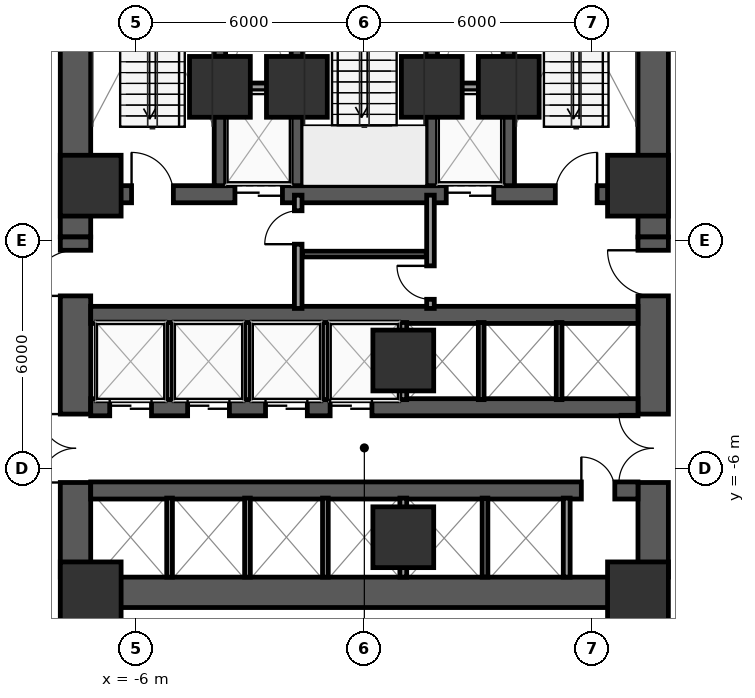
"""IFC4 building model, lengths in metres.
Left out: names, types, materials, properties, quantities, classifications, styles, units other than length and angle.
Written with IfcOpenShell. Run it as: python <this file> out.ifc"""

import sys

from ifc_helpers import new_model, si_unit, direction, frame, frame_2d, origin, origin_2d, place, context, subcontext, project, spatial, rectangle, extrude, element, fill, save


model = new_model("IFC4")
c1 = context("Model", 3, precision=1e-05, world=origin(), true_north=direction((0.0, 1.0)))
c2 = subcontext(c1, "Body", "Model", "MODEL_VIEW")
j1 = project(units=[si_unit("LENGTHUNIT", "METRE"), si_unit("PLANEANGLEUNIT", "RADIAN")], contexts=[c1])
p1 = place(None, origin())
s1 = spatial("IfcSite", under=j1, at=p1, CompositionType="ELEMENT")
p2 = place(p1, origin())
s2 = spatial("IfcBuilding", under=s1, at=p2, CompositionType="ELEMENT")
p3 = place(p2, frame((0.0, 0.0, 11.5)))
s3 = spatial("IfcBuildingStorey", under=s2, at=p3, CompositionType="ELEMENT", Elevation=11.5)
p4 = place(p3, frame((-7.2, 1.225, 0.0), z_axis=(0.0, 0.0, 1.0), x_axis=(1.0, 0.0, 0.0)))
e1 = element("IfcWall", 1, at=p4, inside=s3, PredefinedType="SHEAR", context=c2, shape_type="SweptSolid", body=[
    extrude(rectangle(XDim=14.4, YDim=0.45, at=frame_2d((7.2, 0.0))), origin(), (0.0, 0.0, 1.0), 5.7),
])
p5 = place(p4, frame((3.795, 0.0, 0.0)))
e2 = element("IfcOpeningElement", 2, at=p5, cuts=e1, PredefinedType="OPENING", context=c2, shape_type="SweptSolid", body=[
    extrude(rectangle(XDim=1.25, YDim=2.25, at=frame_2d((0.625, 1.125))), frame((0.0, 0.235, 0.0), z_axis=(0.0, -1.0, 0.0), x_axis=(1.0, 0.0, 0.0)), (0.0, 0.0, 1.0), 0.47),
])
p6 = place(p4, frame((9.355, 0.0, 0.0)))
e3 = element("IfcOpeningElement", 3, at=p6, cuts=e1, PredefinedType="OPENING", context=c2, shape_type="SweptSolid", body=[
    extrude(rectangle(XDim=1.25, YDim=2.25, at=frame_2d((0.625, 1.125))), frame((0.0, 0.235, 0.0), z_axis=(0.0, -1.0, 0.0), x_axis=(1.0, 0.0, 0.0)), (0.0, 0.0, 1.0), 0.47),
])
p7 = place(p4, frame((1.075, 0.0, 0.0)))
e4 = element("IfcOpeningElement", 4, at=p7, cuts=e1, PredefinedType="OPENING", context=c2, shape_type="SweptSolid", body=[
    extrude(rectangle(XDim=1.1, YDim=2.15, at=frame_2d((0.55, 1.075))), frame((0.0, 0.235, 0.0), z_axis=(0.0, -1.0, 0.0), x_axis=(1.0, 0.0, 0.0)), (0.0, 0.0, 1.0), 0.47),
])
p8 = place(p4, frame((12.225, 0.0, 0.0)))
e5 = element("IfcOpeningElement", 5, at=p8, cuts=e1, PredefinedType="OPENING", context=c2, shape_type="SweptSolid", body=[
    extrude(rectangle(XDim=1.1, YDim=2.15, at=frame_2d((0.55, 1.075))), frame((0.0, 0.235, 0.0), z_axis=(0.0, -1.0, 0.0), x_axis=(1.0, 0.0, 0.0)), (0.0, 0.0, 1.0), 0.47),
])
for number, where, z_axis, x_axis in (
    (6, (-3.8, 1.45, 0.0), (0.0, 0.0, 1.0), (0.0, 1.0, 0.0)),
    (7, (-1.775, 1.45, 0.0), (0.0, 0.0, 1.0), (0.0, 1.0, 0.0)),
    (8, (1.775, 1.45, 0.0), (0.0, 0.0, 1.0), (0.0, 1.0, 0.0)),
    (9, (3.8, 1.45, 0.0), (0.0, 0.0, 1.0), (0.0, 1.0, 0.0)),
):
    element("IfcWall", number, at=place(p3, frame(where, z_axis=z_axis, x_axis=x_axis)), inside=s3, PredefinedType="SHEAR", context=c2, shape_type="SweptSolid", body=[
        extrude(rectangle(XDim=7.7, YDim=0.3, at=frame_2d((3.85, 0.0))), origin(), (0.0, 0.0, 1.0), 5.7),
    ])
for number, where, z_axis, x_axis in (
    (10, (-7.6, 0.1, 0.0), (0.0, 0.0, 1.0), (0.0, 1.0, 0.0)),
    (11, (7.6, 0.1, 0.0), (0.0, 0.0, 1.0), (0.0, 1.0, 0.0)),
):
    element("IfcWall", number, at=place(p3, frame(where, z_axis=z_axis, x_axis=x_axis)), inside=s3, PredefinedType="SHEAR", context=c2, shape_type="SweptSolid", body=[
        extrude(rectangle(XDim=9.05, YDim=0.8, at=frame_2d((4.525, 0.0))), origin(), (0.0, 0.0, 1.0), 5.7),
    ])
p9 = place(p3, frame((-7.6, -8.85, 0.0), z_axis=(0.0, 0.0, 1.0), x_axis=(0.0, 1.0, 0.0)))
e12 = element("IfcWall", 12, at=p9, inside=s3, PredefinedType="SHEAR", context=c2, shape_type="SweptSolid", body=[
    extrude(rectangle(XDim=8.95, YDim=0.8, at=frame_2d((4.475, 0.0))), origin(), (0.0, 0.0, 1.0), 5.7),
])
p10 = place(p9, frame((2.49, 0.0, 0.0)))
e13 = element("IfcOpeningElement", 13, at=p10, cuts=e12, PredefinedType="OPENING", context=c2, shape_type="SweptSolid", body=[
    extrude(rectangle(XDim=1.8, YDim=2.2, at=frame_2d((0.9, 1.1))), frame((0.0, 0.41, 0.0), z_axis=(0.0, -1.0, 0.0), x_axis=(1.0, 0.0, 0.0)), (0.0, 0.0, 1.0), 0.82),
])
p11 = place(p9, frame((7.4, 0.0, 0.0)))
e14 = element("IfcOpeningElement", 14, at=p11, cuts=e12, PredefinedType="OPENING", context=c2, shape_type="SweptSolid", body=[
    extrude(rectangle(XDim=1.2, YDim=2.15, at=frame_2d((0.6, 1.075))), frame((0.0, 0.41, 0.0), z_axis=(0.0, -1.0, 0.0), x_axis=(1.0, 0.0, 0.0)), (0.0, 0.0, 1.0), 0.82),
])
p12 = place(p3, frame((7.6, -8.85, 0.0), z_axis=(0.0, 0.0, 1.0), x_axis=(0.0, 1.0, 0.0)))
e15 = element("IfcWall", 15, at=p12, inside=s3, PredefinedType="SHEAR", context=c2, shape_type="SweptSolid", body=[
    extrude(rectangle(XDim=8.95, YDim=0.8, at=frame_2d((4.475, 0.0))), origin(), (0.0, 0.0, 1.0), 5.7),
])
p13 = place(p12, frame((2.49, 0.0, 0.0)))
e16 = element("IfcOpeningElement", 16, at=p13, cuts=e15, PredefinedType="OPENING", context=c2, shape_type="SweptSolid", body=[
    extrude(rectangle(XDim=1.8, YDim=2.2, at=frame_2d((0.9, 1.1))), frame((0.0, 0.41, 0.0), z_axis=(0.0, -1.0, 0.0), x_axis=(1.0, 0.0, 0.0)), (0.0, 0.0, 1.0), 0.82),
])
p14 = place(p12, frame((7.4, 0.0, 0.0)))
e17 = element("IfcOpeningElement", 17, at=p14, cuts=e15, PredefinedType="OPENING", context=c2, shape_type="SweptSolid", body=[
    extrude(rectangle(XDim=1.2, YDim=2.15, at=frame_2d((0.6, 1.075))), frame((0.0, 0.41, 0.0), z_axis=(0.0, -1.0, 0.0), x_axis=(1.0, 0.0, 0.0)), (0.0, 0.0, 1.0), 0.82),
])
p15 = place(p3, frame((-7.6, -9.25, 0.0), z_axis=(0.0, 0.0, 1.0), x_axis=(1.0, 0.0, 0.0)))
e18 = element("IfcWall", 18, at=p15, inside=s3, PredefinedType="SHEAR", context=c2, shape_type="SweptSolid", body=[
    extrude(rectangle(XDim=15.2, YDim=0.8, at=frame_2d((7.6, 0.0))), origin(), (0.0, 0.0, 1.0), 5.7),
])
p16 = place(p3, frame((-7.2, -1.95, 0.0), z_axis=(0.0, 0.0, 1.0), x_axis=(1.0, 0.0, 0.0)))
e19 = element("IfcWall", 19, at=p16, inside=s3, PredefinedType="SHEAR", context=c2, shape_type="SweptSolid", body=[
    extrude(rectangle(XDim=14.4, YDim=0.45, at=frame_2d((7.2, 0.0))), origin(), (0.0, 0.0, 1.0), 5.7),
])
p17 = place(p3, frame((-7.2, -4.38, 0.0), z_axis=(0.0, 0.0, 1.0), x_axis=(1.0, 0.0, 0.0)))
e20 = element("IfcWall", 20, at=p17, inside=s3, PredefinedType="SHEAR", context=c2, shape_type="SweptSolid", body=[
    extrude(rectangle(XDim=14.4, YDim=0.45, at=frame_2d((7.2, 0.0))), origin(), (0.0, 0.0, 1.0), 5.7),
])
p18 = place(p17, frame((0.5, 0.0, 0.0)))
e21 = element("IfcOpeningElement", 21, at=p18, cuts=e20, PredefinedType="OPENING", context=c2, shape_type="SweptSolid", body=[
    extrude(rectangle(XDim=1.1, YDim=2.2, at=frame_2d((0.55, 1.1))), frame((0.0, 0.235, 0.0), z_axis=(0.0, -1.0, 0.0), x_axis=(1.0, 0.0, 0.0)), (0.0, 0.0, 1.0), 0.47),
])
p19 = place(p17, frame((2.55, 0.0, 0.0)))
e22 = element("IfcOpeningElement", 22, at=p19, cuts=e20, PredefinedType="OPENING", context=c2, shape_type="SweptSolid", body=[
    extrude(rectangle(XDim=1.1, YDim=2.2, at=frame_2d((0.55, 1.1))), frame((0.0, 0.235, 0.0), z_axis=(0.0, -1.0, 0.0), x_axis=(1.0, 0.0, 0.0)), (0.0, 0.0, 1.0), 0.47),
])
p20 = place(p17, frame((4.6, 0.0, 0.0)))
e23 = element("IfcOpeningElement", 23, at=p20, cuts=e20, PredefinedType="OPENING", context=c2, shape_type="SweptSolid", body=[
    extrude(rectangle(XDim=1.1, YDim=2.2, at=frame_2d((0.55, 1.1))), frame((0.0, 0.235, 0.0), z_axis=(0.0, -1.0, 0.0), x_axis=(1.0, 0.0, 0.0)), (0.0, 0.0, 1.0), 0.47),
])
p21 = place(p17, frame((6.3, 0.0, 0.0)))
e24 = element("IfcOpeningElement", 24, at=p21, cuts=e20, PredefinedType="OPENING", context=c2, shape_type="SweptSolid", body=[
    extrude(rectangle(XDim=1.1, YDim=2.2, at=frame_2d((0.55, 1.1))), frame((0.0, 0.235, 0.0), z_axis=(0.0, -1.0, 0.0), x_axis=(1.0, 0.0, 0.0)), (0.0, 0.0, 1.0), 0.47),
])
p22 = place(p3, frame((-7.2, -6.57, 0.0), z_axis=(0.0, 0.0, 1.0), x_axis=(1.0, 0.0, 0.0)))
e25 = element("IfcWall", 25, at=p22, inside=s3, PredefinedType="SHEAR", context=c2, shape_type="SweptSolid", body=[
    extrude(rectangle(XDim=14.4, YDim=0.45, at=frame_2d((7.2, 0.0))), origin(), (0.0, 0.0, 1.0), 5.7),
])
p23 = place(p22, frame((12.91, 0.0, 0.0)))
e26 = element("IfcOpeningElement", 26, at=p23, cuts=e25, PredefinedType="OPENING", context=c2, shape_type="SweptSolid", body=[
    extrude(rectangle(XDim=0.88, YDim=2.15, at=frame_2d((0.44, 1.075))), frame((0.0, 0.235, 0.0), z_axis=(0.0, -1.0, 0.0), x_axis=(1.0, 0.0, 0.0)), (0.0, 0.0, 1.0), 0.47),
])
for number, where, z_axis, x_axis in (
    (27, (-7.2, -9.25, 0.0), (0.0, 0.0, 1.0), (1.0, 0.0, 0.0)),
    (28, (7.2, -9.25, 0.0), (0.0, 0.0, 1.0), (1.0, 0.0, 0.0)),
    (29, (7.2, 1.45, 0.0), (0.0, 0.0, 1.0), (1.0, 0.0, 0.0)),
    (30, (-7.2, 1.45, 0.0), (0.0, 0.0, 1.0), (1.0, 0.0, 0.0)),
    (31, (-3.8, 4.05, 0.0), (0.0, 0.0, 1.0), (1.0, 0.0, 0.0)),
    (32, (3.8, 4.05, 0.0), (0.0, 0.0, 1.0), (1.0, 0.0, 0.0)),
    (33, (-1.775, 4.05, 0.0), (0.0, 0.0, 1.0), (1.0, 0.0, 0.0)),
    (34, (1.775, 4.05, 0.0), (0.0, 0.0, 1.0), (1.0, 0.0, 0.0)),
    (35, (1.025, -3.15, 0.0), (0.0, 0.0, 1.0), (1.0, 0.0, 0.0)),
    (36, (1.025, -7.8, 0.0), (0.0, 0.0, 1.0), (1.0, 0.0, 0.0)),
):
    element("IfcColumn", number, at=place(p3, frame(where, z_axis=z_axis, x_axis=x_axis)), inside=s3, PredefinedType="COLUMN", context=c2, shape_type="SweptSolid", body=[
        extrude(rectangle(XDim=1.6, YDim=1.6, at=origin_2d()), origin(), (0.0, 0.0, 1.0), 6.0),
    ])
for number, where, z_axis, x_axis in (
    (37, (-3.65, 4.05, 0.0), (0.0, 0.0, 1.0), (1.0, 0.0, 0.0)),
    (38, (1.92, 4.05, 0.0), (0.0, 0.0, 1.0), (1.0, 0.0, 0.0)),
):
    element("IfcWall", number, at=place(p3, frame(where, z_axis=z_axis, x_axis=x_axis)), inside=s3, PredefinedType="PARTITIONING", context=c2, shape_type="SweptSolid", body=[
        extrude(rectangle(XDim=1.73, YDim=0.2, at=frame_2d((0.865, 0.0))), origin(), (0.0, 0.0, 1.0), 5.7),
    ])
for number, where, z_axis, x_axis in (
    (39, (-5.125, -4.18, 0.0), (0.0, 0.0, 1.0), (0.0, 1.0, 0.0)),
    (40, (-3.075, -4.18, 0.0), (0.0, 0.0, 1.0), (0.0, 1.0, 0.0)),
    (41, (-1.025, -4.18, 0.0), (0.0, 0.0, 1.0), (0.0, 1.0, 0.0)),
):
    element("IfcWall", number, at=place(p3, frame(where, z_axis=z_axis, x_axis=x_axis)), inside=s3, PredefinedType="PARTITIONING", context=c2, shape_type="SweptSolid", body=[
        extrude(rectangle(XDim=2.03, YDim=0.15, at=frame_2d((1.015, 0.0))), origin(), (0.0, 0.0, 1.0), 5.7),
    ])
p24 = place(p3, frame((1.025, -4.18, 0.0), z_axis=(0.0, 0.0, 1.0), x_axis=(0.0, 1.0, 0.0)))
e42 = element("IfcWall", 42, at=p24, inside=s3, PredefinedType="PARTITIONING", context=c2, shape_type="SweptSolid", body=[
    extrude(rectangle(XDim=2.03, YDim=0.18, at=frame_2d((1.015, 0.0))), origin(), (0.0, 0.0, 1.0), 4.748),
])
for number, where, z_axis, x_axis in (
    (43, (3.075, -4.18, 0.0), (0.0, 0.0, 1.0), (0.0, 1.0, 0.0)),
    (44, (5.125, -4.18, 0.0), (0.0, 0.0, 1.0), (0.0, 1.0, 0.0)),
):
    element("IfcWall", number, at=place(p3, frame(where, z_axis=z_axis, x_axis=x_axis)), inside=s3, PredefinedType="PARTITIONING", context=c2, shape_type="SweptSolid", body=[
        extrude(rectangle(XDim=2.03, YDim=0.15, at=frame_2d((1.015, 0.0))), origin(), (0.0, 0.0, 1.0), 5.7),
    ])
for number, where, z_axis, x_axis in (
    (45, (-5.125, -8.85, 0.0), (0.0, 0.0, 1.0), (0.0, 1.0, 0.0)),
    (46, (-3.075, -8.85, 0.0), (0.0, 0.0, 1.0), (0.0, 1.0, 0.0)),
    (47, (-1.025, -8.85, 0.0), (0.0, 0.0, 1.0), (0.0, 1.0, 0.0)),
):
    element("IfcWall", number, at=place(p3, frame(where, z_axis=z_axis, x_axis=x_axis)), inside=s3, PredefinedType="PARTITIONING", context=c2, shape_type="SweptSolid", body=[
        extrude(rectangle(XDim=2.08, YDim=0.15, at=frame_2d((1.04, 0.0))), origin(), (0.0, 0.0, 1.0), 5.7),
    ])
p25 = place(p3, frame((1.025, -8.85, 0.0), z_axis=(0.0, 0.0, 1.0), x_axis=(0.0, 1.0, 0.0)))
e48 = element("IfcWall", 48, at=p25, inside=s3, PredefinedType="PARTITIONING", context=c2, shape_type="SweptSolid", body=[
    extrude(rectangle(XDim=2.08, YDim=0.18, at=frame_2d((1.04, 0.0))), origin(), (0.0, 0.0, 1.0), 4.748),
])
p26 = place(p3, frame((3.175, -8.85, 0.0), z_axis=(0.0, 0.0, 1.0), x_axis=(0.0, 1.0, 0.0)))
e49 = element("IfcWall", 49, at=p26, inside=s3, PredefinedType="PARTITIONING", context=c2, shape_type="SweptSolid", body=[
    extrude(rectangle(XDim=2.08, YDim=0.15, at=frame_2d((1.04, 0.0))), origin(), (0.0, 0.0, 1.0), 5.7),
])
p27 = place(p3, frame((5.325, -8.85, 0.0), z_axis=(0.0, 0.0, 1.0), x_axis=(0.0, 1.0, 0.0)))
e50 = element("IfcWall", 50, at=p27, inside=s3, PredefinedType="PARTITIONING", context=c2, shape_type="SweptSolid", body=[
    extrude(rectangle(XDim=2.08, YDim=0.18, at=frame_2d((1.04, 0.0))), origin(), (0.0, 0.0, 1.0), 5.7),
])
p28 = place(p3, frame((-1.74, -1.78, 0.0), z_axis=(0.0, 0.0, 1.0), x_axis=(0.0, 1.0, 0.0)))
e51 = element("IfcWall", 51, at=p28, inside=s3, PredefinedType="PARTITIONING", context=c2, shape_type="SweptSolid", body=[
    extrude(rectangle(XDim=2.98, YDim=0.2, at=frame_2d((1.49, 0.0))), origin(), (0.0, 0.0, 1.0), 5.7),
])
p29 = place(p28, frame((1.69, 0.0, 0.0)))
e52 = element("IfcOpeningElement", 52, at=p29, cuts=e51, PredefinedType="OPENING", context=c2, shape_type="SweptSolid", body=[
    extrude(rectangle(XDim=0.88, YDim=2.15, at=frame_2d((0.44, 1.075))), frame((0.0, 0.11, 0.0), z_axis=(0.0, -1.0, 0.0), x_axis=(1.0, 0.0, 0.0)), (0.0, 0.0, 1.0), 0.22),
])
p30 = place(p3, frame((1.74, -1.78, 0.0), z_axis=(0.0, 0.0, 1.0), x_axis=(0.0, 1.0, 0.0)))
e53 = element("IfcWall", 53, at=p30, inside=s3, PredefinedType="PARTITIONING", context=c2, shape_type="SweptSolid", body=[
    extrude(rectangle(XDim=2.98, YDim=0.2, at=frame_2d((1.49, 0.0))), origin(), (0.0, 0.0, 1.0), 5.7),
])
p31 = place(p30, frame((0.24, 0.0, 0.0)))
e54 = element("IfcOpeningElement", 54, at=p31, cuts=e53, PredefinedType="OPENING", context=c2, shape_type="SweptSolid", body=[
    extrude(rectangle(XDim=0.88, YDim=2.15, at=frame_2d((0.44, 1.075))), frame((0.0, 0.11, 0.0), z_axis=(0.0, -1.0, 0.0), x_axis=(1.0, 0.0, 0.0)), (0.0, 0.0, 1.0), 0.22),
])
p32 = place(p3, frame((-1.63, -0.35, 0.0), z_axis=(0.0, 0.0, 1.0), x_axis=(1.0, 0.0, 0.0)))
e55 = element("IfcWall", 55, at=p32, inside=s3, PredefinedType="PARTITIONING", context=c2, shape_type="SweptSolid", body=[
    extrude(rectangle(XDim=3.26, YDim=0.15, at=frame_2d((1.63, 0.0))), origin(), (0.0, 0.0, 1.0), 5.7),
])
p33 = place(p18, origin())
e56 = element("IfcDoor", 56, at=p33, inside=s3, OperationType="DOUBLE_DOOR_SLIDING", PredefinedType="DOOR", context=c2, shape_type="SweptSolid", body=[
    extrude(rectangle(XDim=1.1, YDim=2.2, at=frame_2d((0.55, 1.1))), frame((0.0, 0.025, 0.0), z_axis=(0.0, -1.0, 0.0), x_axis=(1.0, 0.0, 0.0)), (0.0, 0.0, 1.0), 0.05),
])
fill(e21, e56)
p34 = place(p19, origin())
e57 = element("IfcDoor", 57, at=p34, inside=s3, OperationType="DOUBLE_DOOR_SLIDING", PredefinedType="DOOR", context=c2, shape_type="SweptSolid", body=[
    extrude(rectangle(XDim=1.1, YDim=2.2, at=frame_2d((0.55, 1.1))), frame((0.0, 0.025, 0.0), z_axis=(0.0, -1.0, 0.0), x_axis=(1.0, 0.0, 0.0)), (0.0, 0.0, 1.0), 0.05),
])
fill(e22, e57)
p35 = place(p20, origin())
e58 = element("IfcDoor", 58, at=p35, inside=s3, OperationType="DOUBLE_DOOR_SLIDING", PredefinedType="DOOR", context=c2, shape_type="SweptSolid", body=[
    extrude(rectangle(XDim=1.1, YDim=2.2, at=frame_2d((0.55, 1.1))), frame((0.0, 0.025, 0.0), z_axis=(0.0, -1.0, 0.0), x_axis=(1.0, 0.0, 0.0)), (0.0, 0.0, 1.0), 0.05),
])
fill(e23, e58)
p36 = place(p21, origin())
e59 = element("IfcDoor", 59, at=p36, inside=s3, OperationType="DOUBLE_DOOR_SLIDING", PredefinedType="DOOR", context=c2, shape_type="SweptSolid", body=[
    extrude(rectangle(XDim=1.1, YDim=2.2, at=frame_2d((0.55, 1.1))), frame((0.0, 0.025, 0.0), z_axis=(0.0, -1.0, 0.0), x_axis=(1.0, 0.0, 0.0)), (0.0, 0.0, 1.0), 0.05),
])
fill(e24, e59)
p37 = place(p5, origin())
e60 = element("IfcDoor", 60, at=p37, inside=s3, OperationType="DOUBLE_DOOR_SLIDING", PredefinedType="DOOR", context=c2, shape_type="SweptSolid", body=[
    extrude(rectangle(XDim=1.25, YDim=2.25, at=frame_2d((0.625, 1.125))), frame((0.0, 0.025, 0.0), z_axis=(0.0, -1.0, 0.0), x_axis=(1.0, 0.0, 0.0)), (0.0, 0.0, 1.0), 0.05),
])
fill(e2, e60)
p38 = place(p6, origin())
e61 = element("IfcDoor", 61, at=p38, inside=s3, OperationType="DOUBLE_DOOR_SLIDING", PredefinedType="DOOR", context=c2, shape_type="SweptSolid", body=[
    extrude(rectangle(XDim=1.25, YDim=2.25, at=frame_2d((0.625, 1.125))), frame((0.0, 0.025, 0.0), z_axis=(0.0, -1.0, 0.0), x_axis=(1.0, 0.0, 0.0)), (0.0, 0.0, 1.0), 0.05),
])
fill(e3, e61)
p39 = place(p7, origin())
e62 = element("IfcDoor", 62, at=p39, inside=s3, OperationType="SINGLE_SWING_LEFT", PredefinedType="DOOR", context=c2, shape_type="SweptSolid", body=[
    extrude(rectangle(XDim=1.1, YDim=2.15, at=frame_2d((0.55, 1.075))), frame((0.0, 0.025, 0.0), z_axis=(0.0, -1.0, 0.0), x_axis=(1.0, 0.0, 0.0)), (0.0, 0.0, 1.0), 0.05),
])
fill(e4, e62)
p40 = place(p8, origin())
e63 = element("IfcDoor", 63, at=p40, inside=s3, OperationType="SINGLE_SWING_RIGHT", PredefinedType="DOOR", context=c2, shape_type="SweptSolid", body=[
    extrude(rectangle(XDim=1.1, YDim=2.15, at=frame_2d((0.55, 1.075))), frame((0.0, 0.025, 0.0), z_axis=(0.0, -1.0, 0.0), x_axis=(1.0, 0.0, 0.0)), (0.0, 0.0, 1.0), 0.05),
])
fill(e5, e63)
p41 = place(p10, origin())
e64 = element("IfcDoor", 64, at=p41, inside=s3, OperationType="DOUBLE_DOOR_SINGLE_SWING", PredefinedType="DOOR", context=c2, shape_type="SweptSolid", body=[
    extrude(rectangle(XDim=1.8, YDim=2.2, at=frame_2d((0.9, 1.1))), frame((0.0, 0.025, 0.0), z_axis=(0.0, -1.0, 0.0), x_axis=(1.0, 0.0, 0.0)), (0.0, 0.0, 1.0), 0.05),
])
fill(e13, e64)
p42 = place(p11, origin())
e65 = element("IfcDoor", 65, at=p42, inside=s3, OperationType="SINGLE_SWING_LEFT", PredefinedType="DOOR", context=c2, shape_type="SweptSolid", body=[
    extrude(rectangle(XDim=1.2, YDim=2.15, at=frame_2d((0.6, 1.075))), frame((0.0, 0.025, 0.0), z_axis=(0.0, -1.0, 0.0), x_axis=(1.0, 0.0, 0.0)), (0.0, 0.0, 1.0), 0.05),
])
fill(e14, e65)
p43 = place(p13, origin())
e66 = element("IfcDoor", 66, at=p43, inside=s3, OperationType="DOUBLE_DOOR_SINGLE_SWING", PredefinedType="DOOR", context=c2, shape_type="SweptSolid", body=[
    extrude(rectangle(XDim=1.8, YDim=2.2, at=frame_2d((0.9, 1.1))), frame((0.0, 0.025, 0.0), z_axis=(0.0, -1.0, 0.0), x_axis=(1.0, 0.0, 0.0)), (0.0, 0.0, 1.0), 0.05),
])
fill(e16, e66)
p44 = place(p14, origin())
e67 = element("IfcDoor", 67, at=p44, inside=s3, OperationType="SINGLE_SWING_RIGHT", PredefinedType="DOOR", context=c2, shape_type="SweptSolid", body=[
    extrude(rectangle(XDim=1.2, YDim=2.15, at=frame_2d((0.6, 1.075))), frame((0.0, 0.025, 0.0), z_axis=(0.0, -1.0, 0.0), x_axis=(1.0, 0.0, 0.0)), (0.0, 0.0, 1.0), 0.05),
])
fill(e17, e67)
p45 = place(p23, origin())
e68 = element("IfcDoor", 68, at=p45, inside=s3, OperationType="SINGLE_SWING_LEFT", PredefinedType="DOOR", context=c2, shape_type="SweptSolid", body=[
    extrude(rectangle(XDim=0.88, YDim=2.15, at=frame_2d((0.44, 1.075))), frame((0.0, 0.025, 0.0), z_axis=(0.0, -1.0, 0.0), x_axis=(1.0, 0.0, 0.0)), (0.0, 0.0, 1.0), 0.05),
])
fill(e26, e68)
p46 = place(p29, origin())
e69 = element("IfcDoor", 69, at=p46, inside=s3, OperationType="SINGLE_SWING_LEFT", PredefinedType="DOOR", context=c2, shape_type="SweptSolid", body=[
    extrude(rectangle(XDim=0.88, YDim=2.15, at=frame_2d((0.44, 1.075))), frame((0.0, 0.025, 0.0), z_axis=(0.0, -1.0, 0.0), x_axis=(1.0, 0.0, 0.0)), (0.0, 0.0, 1.0), 0.05),
])
fill(e52, e69)
p47 = place(p31, origin())
e70 = element("IfcDoor", 70, at=p47, inside=s3, OperationType="SINGLE_SWING_RIGHT", PredefinedType="DOOR", context=c2, shape_type="SweptSolid", body=[
    extrude(rectangle(XDim=0.88, YDim=2.15, at=frame_2d((0.44, 1.075))), frame((0.0, 0.025, 0.0), z_axis=(0.0, -1.0, 0.0), x_axis=(1.0, 0.0, 0.0)), (0.0, 0.0, 1.0), 0.05),
])
fill(e54, e70)
save(model, sys.argv[1])
